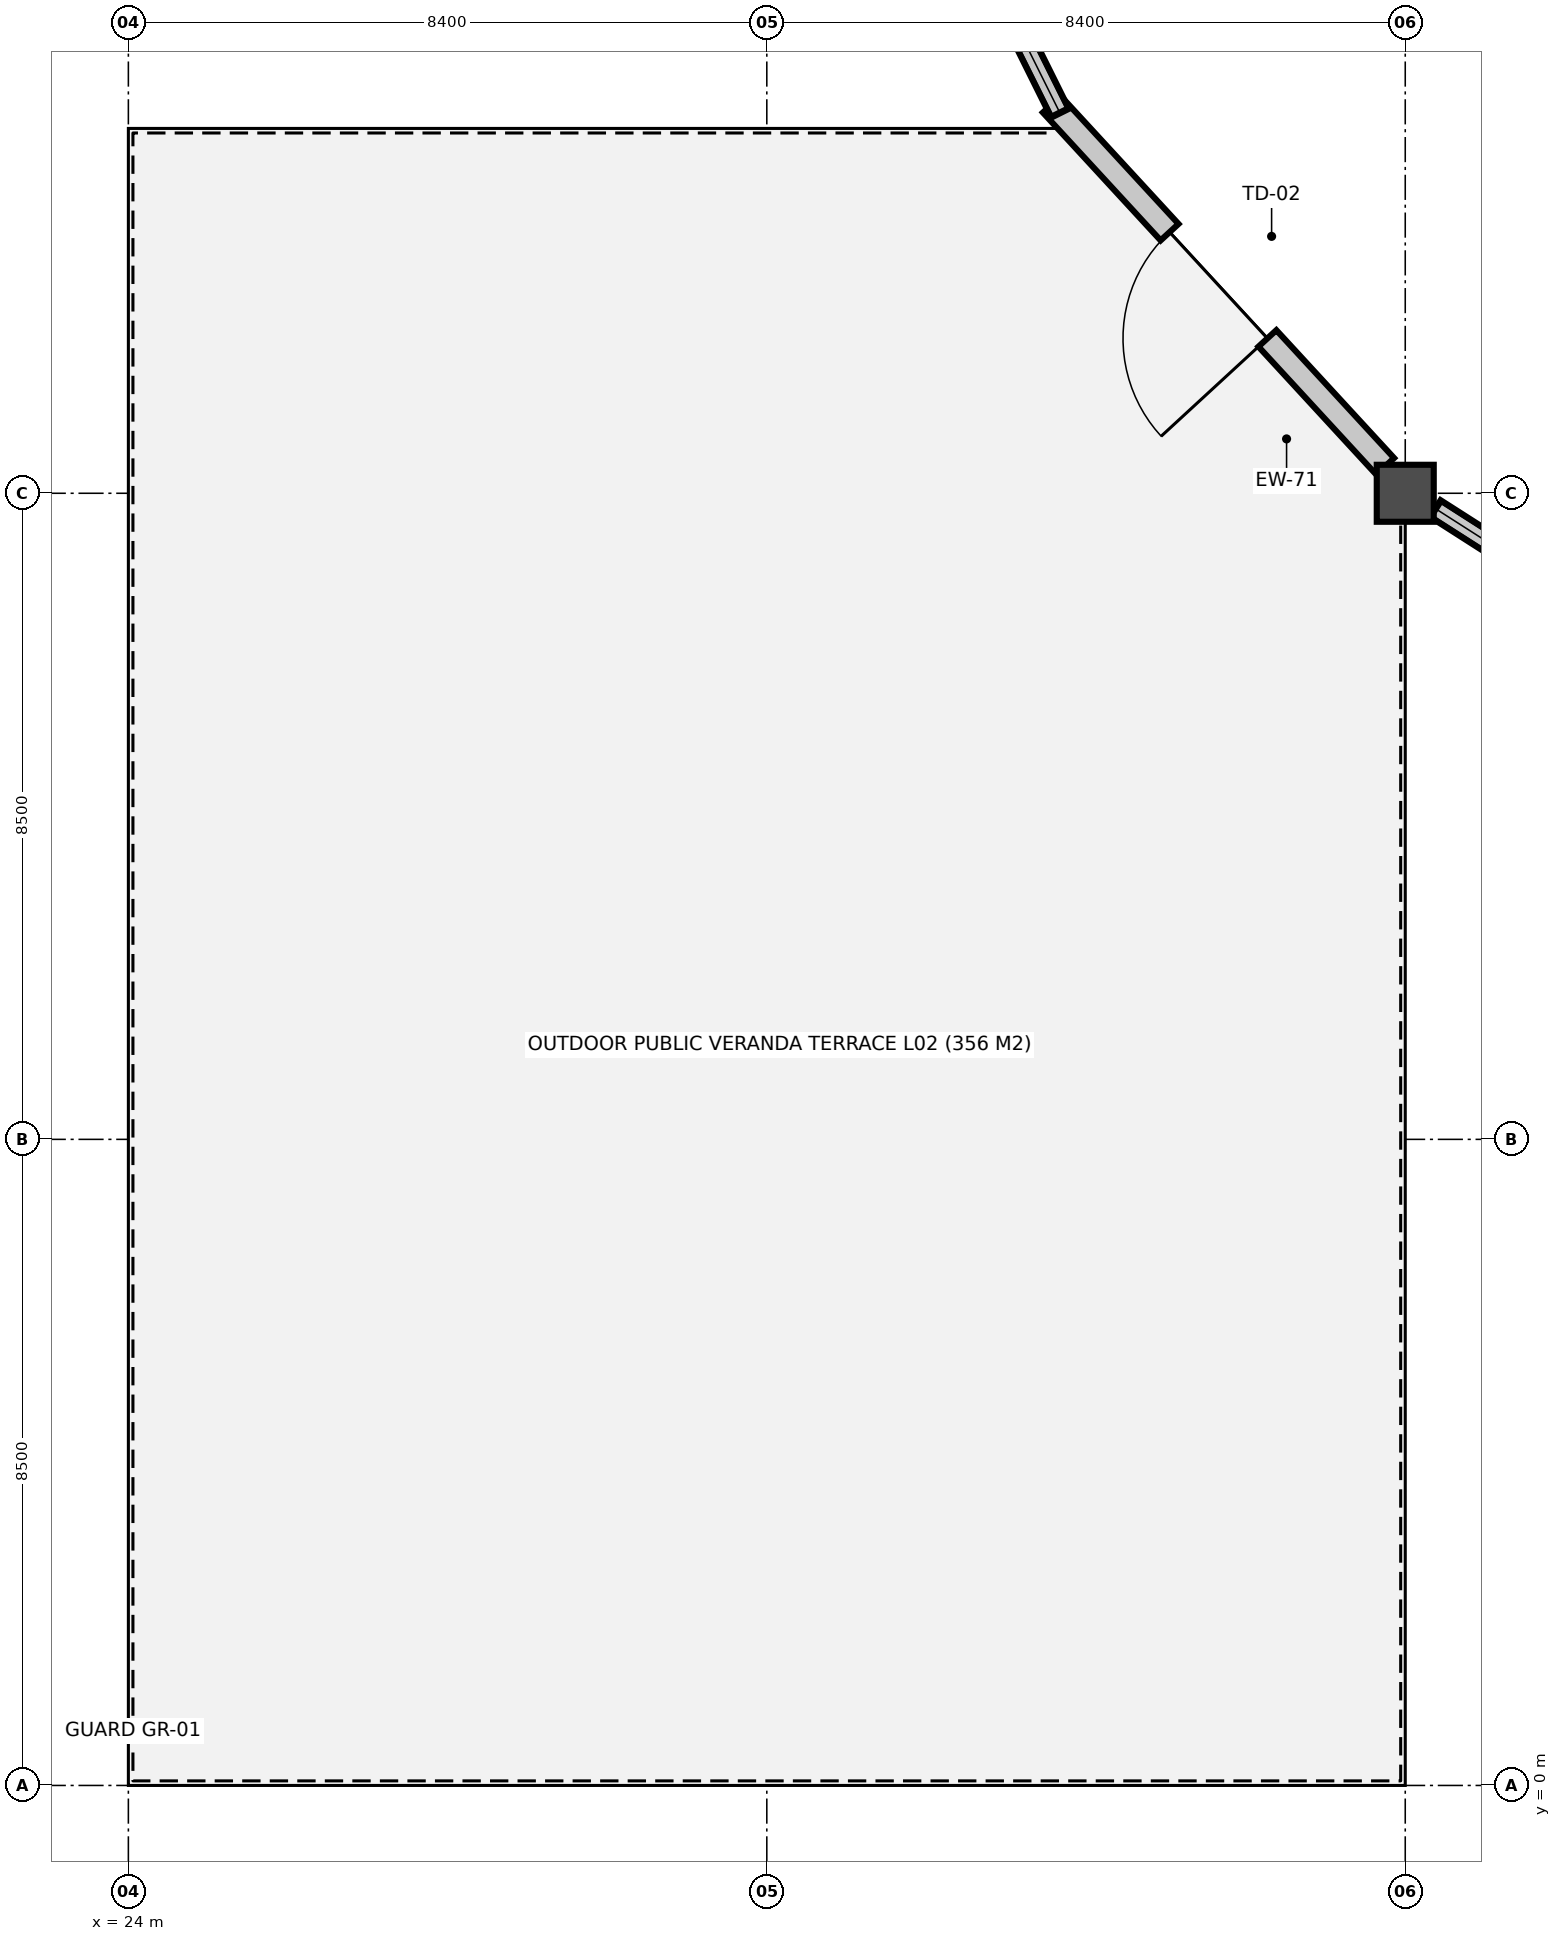
"""IFC4 building model, lengths in metres.
Left out: names, types, materials, properties, quantities, classifications, styles, units other than length and angle.
Written with IfcOpenShell. Run it as: python <this file> out.ifc"""

import sys

from ifc_helpers import new_model, si_unit, direction, frame, frame_2d, origin, origin_2d, place, context, subcontext, project, spatial, rectangle, extrude, element, fill, save


model = new_model("IFC4")
c1 = context("Model", 3, precision=1e-05, world=origin(), true_north=direction((0.0, 1.0)))
c2 = subcontext(c1, "Body", "Model", "MODEL_VIEW")
j1 = project(units=[si_unit("LENGTHUNIT", "METRE"), si_unit("PLANEANGLEUNIT", "RADIAN")], contexts=[c1])
p1 = place(None, origin())
s1 = spatial("IfcSite", under=j1, at=p1, CompositionType="ELEMENT")
p2 = place(p1, origin())
s2 = spatial("IfcBuilding", under=s1, at=p2, CompositionType="ELEMENT")
p3 = place(p2, frame((0.0, 0.0, 10.2)))
s3 = spatial("IfcBuildingStorey", under=s2, at=p3, CompositionType="ELEMENT", Elevation=10.2)
p4 = place(p3, frame((40.8, 17.0, 0.0), z_axis=(0.0, 0.0, 1.0), x_axis=(1.0, 0.0, 0.0)))
e1 = element("IfcColumn", 1, at=p4, inside=s3, PredefinedType="COLUMN", context=c2, shape_type="SweptSolid", body=[
    extrude(rectangle(XDim=0.75, YDim=0.75, at=origin_2d()), origin(), (0.0, 0.0, 1.0), 4.8),
])
p5 = place(p3, frame((46.8, 13.215, 0.0), z_axis=(0.0, 0.0, 1.0), x_axis=(-0.842489930614, 0.538712090836, 0.0)))
e2 = element("IfcWall", 2, at=p5, inside=s3, PredefinedType="PARAPET", context=c2, shape_type="SweptSolid", body=[
    extrude(rectangle(XDim=6.653, YDim=0.26, at=frame_2d((3.326, 0.0))), origin(), (0.0, 0.0, 1.0), 1.12),
])
p6 = place(p3, frame((40.535, 17.355, 0.0), z_axis=(0.0, 0.0, 1.0), x_axis=(-0.677355479106, 0.735655867186, 0.0)))
e3 = element("IfcWall", 3, at=p6, inside=s3, PredefinedType="SOLIDWALL", context=c2, shape_type="SweptSolid", body=[
    extrude(rectangle(XDim=6.474, YDim=0.32, at=frame_2d((3.237, 0.0))), origin(), (0.0, 0.0, 1.0), 3.482),
])
p7 = place(p6, frame((2.287, 0.0, 0.0)))
e4 = element("IfcOpeningElement", 4, at=p7, cuts=e3, PredefinedType="OPENING", context=c2, shape_type="SweptSolid", body=[
    extrude(rectangle(XDim=1.9, YDim=2.38, at=frame_2d((0.95, 1.19))), frame((0.0, 0.17, 0.0), z_axis=(0.0, -1.0, 0.0), x_axis=(1.0, 0.0, 0.0)), (0.0, 0.0, 1.0), 0.34),
])
p8 = place(p3, frame((36.259, 22.0, 0.0), z_axis=(0.0, 0.0, 1.0), x_axis=(-0.445112384226, 0.895474715114, 0.0)))
e5 = element("IfcWall", 5, at=p8, inside=s3, PredefinedType="PARAPET", context=c2, shape_type="SweptSolid", body=[
    extrude(rectangle(XDim=6.464, YDim=0.26, at=frame_2d((3.232, 0.0))), origin(), (0.0, 0.0, 1.0), 1.12),
])
p9 = place(p7, origin())
e6 = element("IfcDoor", 6, at=p9, inside=s3, OperationType="SINGLE_SWING_LEFT", PredefinedType="DOOR", context=c2, shape_type="SweptSolid", body=[
    extrude(rectangle(XDim=1.9, YDim=2.38, at=frame_2d((0.95, 1.19))), frame((0.0, 0.025, 0.0), z_axis=(0.0, -1.0, 0.0), x_axis=(1.0, 0.0, 0.0)), (0.0, 0.0, 1.0), 0.05),
])
fill(e4, e6)
save(model, sys.argv[1])
